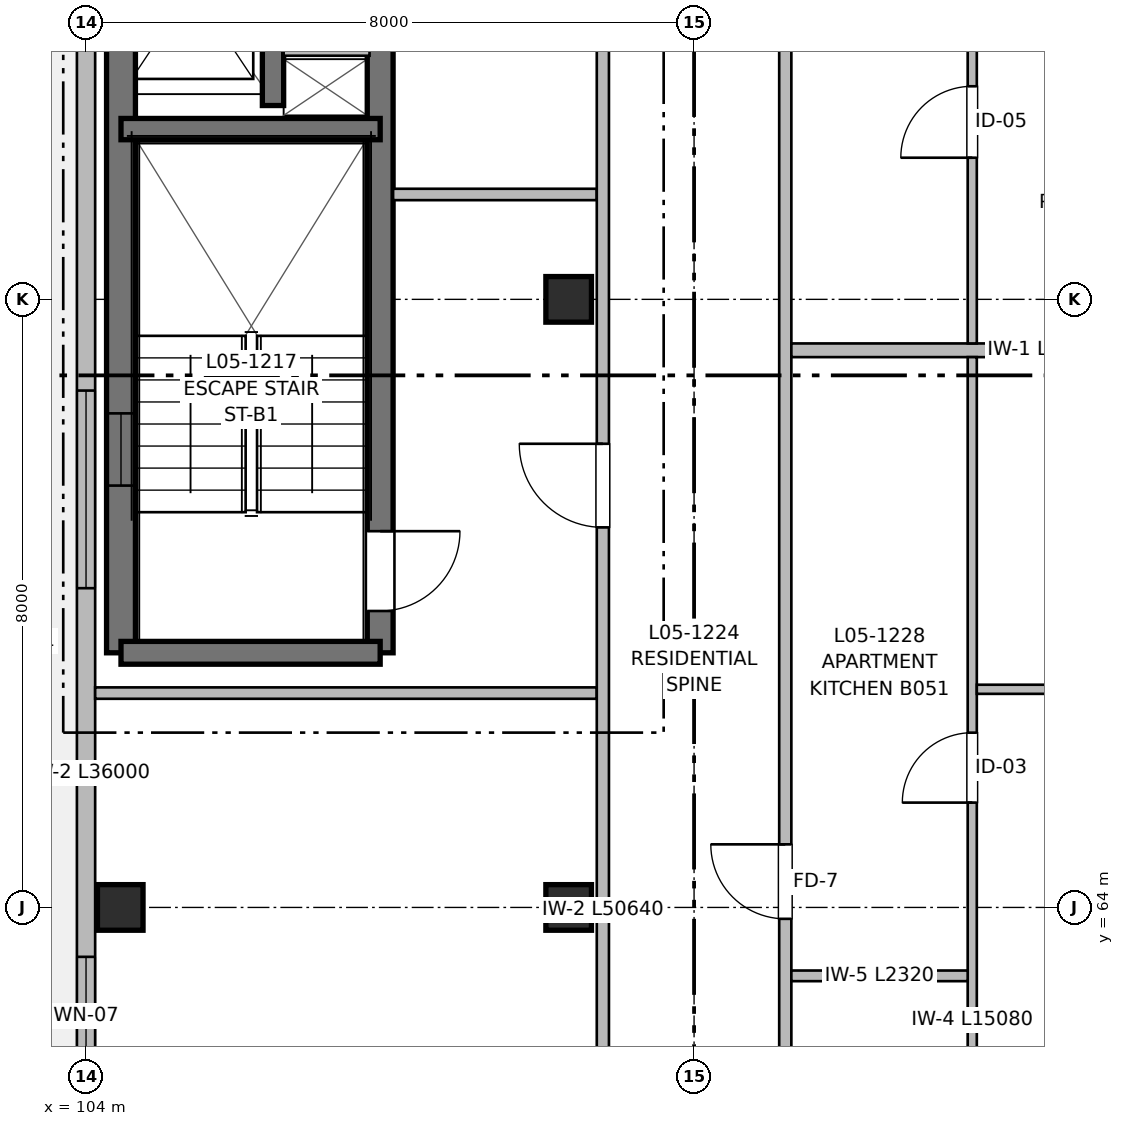
"""IFC4 building model, lengths in metres.
Left out: names, types, materials, properties, quantities, classifications, styles, units other than length and angle.
Written with IfcOpenShell. Run it as: python <this file> out.ifc"""

import sys

from ifc_helpers import new_model, si_unit, direction, frame, frame_2d, origin, origin_2d, place, context, subcontext, project, spatial, rectangle, extrude, element, fill, save


model = new_model("IFC4")
c1 = context("Model", 3, precision=1e-05, world=origin(), true_north=direction((0.0, 1.0)))
c2 = subcontext(c1, "Body", "Model", "MODEL_VIEW")
j1 = project(units=[si_unit("LENGTHUNIT", "METRE"), si_unit("PLANEANGLEUNIT", "RADIAN")], contexts=[c1])
p1 = place(None, origin())
s1 = spatial("IfcSite", under=j1, at=p1, CompositionType="ELEMENT")
p2 = place(p1, origin())
s2 = spatial("IfcBuilding", under=s1, at=p2, CompositionType="ELEMENT")
p3 = place(p2, frame((0.0, 0.0, 16.96)))
s3 = spatial("IfcBuildingStorey", under=s2, at=p3, CompositionType="ELEMENT", Elevation=16.96)
for number, where, z_axis, x_axis in (
    (1, (104.45, 64.0, 0.0), (0.0, 0.0, 1.0), (1.0, 0.0, 0.0)),
    (2, (110.35, 64.0, 0.0), (0.0, 0.0, 1.0), (1.0, 0.0, 0.0)),
    (3, (110.35, 72.0, 0.0), (0.0, 0.0, 1.0), (1.0, 0.0, 0.0)),
):
    element("IfcColumn", number, at=place(p3, frame(where, z_axis=z_axis, x_axis=x_axis)), inside=s3, PredefinedType="COLUMN", context=c2, shape_type="SweptSolid", body=[
        extrude(rectangle(XDim=0.6, YDim=0.6, at=origin_2d()), origin(), (0.0, 0.0, 1.0), 3.2),
    ])
p4 = place(p3, frame((104.46, 67.35, 0.0), z_axis=(0.0, 0.0, 1.0), x_axis=(0.0, 1.0, 0.0)))
e4 = element("IfcWall", 4, at=p4, inside=s3, PredefinedType="SHEAR", context=c2, shape_type="SweptSolid", body=[
    extrude(rectangle(XDim=12.45, YDim=0.38, at=frame_2d((6.225, 0.0))), origin(), (0.0, 0.0, 1.0), 3.2),
])
p5 = place(p4, frame((2.2, 0.0, 0.97)))
e5 = element("IfcOpeningElement", 5, at=p5, cuts=e4, PredefinedType="OPENING", context=c2, shape_type="SweptSolid", body=[
    extrude(rectangle(XDim=0.95, YDim=1.25, at=frame_2d((0.475, 0.625))), frame((0.0, 0.2, 0.0), z_axis=(0.0, -1.0, 0.0), x_axis=(1.0, 0.0, 0.0)), (0.0, 0.0, 1.0), 0.4),
])
p6 = place(p3, frame((107.87, 79.8, 0.0), z_axis=(0.0, 0.0, 1.0), x_axis=(0.0, -1.0, 0.0)))
e6 = element("IfcWall", 6, at=p6, inside=s3, PredefinedType="SHEAR", context=c2, shape_type="SweptSolid", body=[
    extrude(rectangle(XDim=12.45, YDim=0.34, at=frame_2d((6.225, 0.0))), origin(), (0.0, 0.0, 1.0), 3.2),
])
p7 = place(p6, frame((10.85, 0.0, 0.0)))
e7 = element("IfcOpeningElement", 7, at=p7, cuts=e6, PredefinedType="OPENING", context=c2, shape_type="SweptSolid", body=[
    extrude(rectangle(XDim=1.05, YDim=2.15, at=frame_2d((0.525, 1.075))), frame((0.0, 0.18, 0.0), z_axis=(0.0, -1.0, 0.0), x_axis=(1.0, 0.0, 0.0)), (0.0, 0.0, 1.0), 0.36),
])
p8 = place(p3, frame((107.87, 67.35, 0.0), z_axis=(0.0, 0.0, 1.0), x_axis=(-1.0, 0.0, 0.0)))
e8 = element("IfcWall", 8, at=p8, inside=s3, PredefinedType="SHEAR", context=c2, shape_type="SweptSolid", body=[
    extrude(rectangle(XDim=3.41, YDim=0.3, at=frame_2d((1.705, 0.0))), origin(), (0.0, 0.0, 1.0), 3.2),
])
p9 = place(p3, frame((104.46, 74.24, 0.0), z_axis=(0.0, 0.0, 1.0), x_axis=(1.0, 0.0, 0.0)))
e9 = element("IfcWall", 9, at=p9, inside=s3, PredefinedType="SHEAR", context=c2, shape_type="SweptSolid", body=[
    extrude(rectangle(XDim=3.41, YDim=0.28, at=frame_2d((1.705, 0.0))), origin(), (0.0, 0.0, 1.0), 3.2),
])
p10 = place(p3, frame((106.46, 74.55, 0.0), z_axis=(0.0, 0.0, 1.0), x_axis=(0.0, 1.0, 0.0)))
e10 = element("IfcWall", 10, at=p10, inside=s3, PredefinedType="SHEAR", context=c2, shape_type="SweptSolid", body=[
    extrude(rectangle(XDim=5.25, YDim=0.28, at=frame_2d((2.625, 0.0))), origin(), (0.0, 0.0, 1.0), 3.2),
])
p11 = place(p10, frame((1.15, 0.0, 0.0)))
e11 = element("IfcOpeningElement", 11, at=p11, cuts=e10, PredefinedType="OPENING", context=c2, shape_type="SweptSolid", body=[
    extrude(rectangle(XDim=1.0, YDim=2.15, at=frame_2d((0.5, 1.075))), frame((0.0, 0.15, 0.0), z_axis=(0.0, -1.0, 0.0), x_axis=(1.0, 0.0, 0.0)), (0.0, 0.0, 1.0), 0.3),
])
p12 = place(p10, frame((3.85, 0.0, 0.0)))
e12 = element("IfcOpeningElement", 12, at=p12, cuts=e10, PredefinedType="OPENING", context=c2, shape_type="SweptSolid", body=[
    extrude(rectangle(XDim=0.9, YDim=2.15, at=frame_2d((0.45, 1.075))), frame((0.0, 0.15, 0.0), z_axis=(0.0, -1.0, 0.0), x_axis=(1.0, 0.0, 0.0)), (0.0, 0.0, 1.0), 0.3),
])
p13 = place(p3, frame((106.6, 75.28, 0.0), z_axis=(0.0, 0.0, 1.0), x_axis=(1.0, 0.0, 0.0)))
e13 = element("IfcWall", 13, at=p13, inside=s3, PredefinedType="PARTITIONING", context=c2, shape_type="SweptSolid", body=[
    extrude(rectangle(XDim=1.13, YDim=0.15, at=frame_2d((0.565, 0.0))), origin(), (0.0, 0.0, 1.0), 2.95),
])
p14 = place(p3, frame((104.0, 56.0, 0.0), z_axis=(0.0, 0.0, 1.0), x_axis=(0.0, 1.0, 0.0)))
e14 = element("IfcWall", 14, at=p14, inside=s3, PredefinedType="SOLIDWALL", context=c2, shape_type="SweptSolid", body=[
    extrude(rectangle(XDim=36.0, YDim=0.24, at=frame_2d((18.0, 0.0))), origin(), (0.0, 0.0, 1.0), 2.98),
])
p15 = place(p14, frame((3.9, 0.0, 0.0)))
e15 = element("IfcOpeningElement", 15, at=p15, cuts=e14, PredefinedType="OPENING", context=c2, shape_type="SweptSolid", body=[
    extrude(rectangle(XDim=1.2, YDim=2.2, at=frame_2d((0.6, 1.1))), frame((0.0, 0.13, 0.0), z_axis=(0.0, -1.0, 0.0), x_axis=(1.0, 0.0, 0.0)), (0.0, 0.0, 1.0), 0.26),
])
p16 = place(p14, frame((5.8, 0.0, 0.82)))
e16 = element("IfcOpeningElement", 16, at=p16, cuts=e14, PredefinedType="OPENING", context=c2, shape_type="SweptSolid", body=[
    extrude(rectangle(XDim=1.55, YDim=1.4, at=frame_2d((0.775, 0.7))), frame((0.0, 0.13, 0.0), z_axis=(0.0, -1.0, 0.0), x_axis=(1.0, 0.0, 0.0)), (0.0, 0.0, 1.0), 0.26),
])
p17 = place(p14, frame((12.2, 0.0, 0.67)))
e17 = element("IfcOpeningElement", 17, at=p17, cuts=e14, PredefinedType="OPENING", context=c2, shape_type="SweptSolid", body=[
    extrude(rectangle(XDim=2.6, YDim=1.55, at=frame_2d((1.3, 0.775))), frame((0.0, 0.13, 0.0), z_axis=(0.0, -1.0, 0.0), x_axis=(1.0, 0.0, 0.0)), (0.0, 0.0, 1.0), 0.26),
])
p18 = place(p14, frame((19.86, 0.0, 0.72)))
e18 = element("IfcOpeningElement", 18, at=p18, cuts=e14, PredefinedType="OPENING", context=c2, shape_type="SweptSolid", body=[
    extrude(rectangle(XDim=1.68, YDim=1.5, at=frame_2d((0.84, 0.75))), frame((0.0, 0.13, 0.0), z_axis=(0.0, -1.0, 0.0), x_axis=(1.0, 0.0, 0.0)), (0.0, 0.0, 1.0), 0.26),
])
p19 = place(p14, frame((30.6, 0.0, 0.72)))
e19 = element("IfcOpeningElement", 19, at=p19, cuts=e14, PredefinedType="OPENING", context=c2, shape_type="SweptSolid", body=[
    extrude(rectangle(XDim=1.8, YDim=1.5, at=frame_2d((0.9, 0.75))), frame((0.0, 0.13, 0.0), z_axis=(0.0, -1.0, 0.0), x_axis=(1.0, 0.0, 0.0)), (0.0, 0.0, 1.0), 0.26),
])
p20 = place(p3, frame((104.12, 66.82, 0.0), z_axis=(0.0, 0.0, 1.0), x_axis=(1.0, 0.0, 0.0)))
e20 = element("IfcWall", 20, at=p20, inside=s3, PredefinedType="PARTITIONING", context=c2, shape_type="SweptSolid", body=[
    extrude(rectangle(XDim=6.6, YDim=0.15, at=frame_2d((3.3, 0.0))), origin(), (0.0, 0.0, 1.0), 2.935),
])
p21 = place(p3, frame((108.04, 73.38, 0.0), z_axis=(0.0, 0.0, 1.0), x_axis=(1.0, 0.0, 0.0)))
e21 = element("IfcWall", 21, at=p21, inside=s3, PredefinedType="PARTITIONING", context=c2, shape_type="SweptSolid", body=[
    extrude(rectangle(XDim=2.68, YDim=0.15, at=frame_2d((1.34, 0.0))), origin(), (0.0, 0.0, 1.0), 2.935),
])
p22 = place(p3, frame((110.8, 56.16, 0.0), z_axis=(0.0, 0.0, 1.0), x_axis=(0.0, 1.0, 0.0)))
e22 = element("IfcWall", 22, at=p22, inside=s3, PredefinedType="PARTITIONING", context=c2, shape_type="SweptSolid", body=[
    extrude(rectangle(XDim=50.64, YDim=0.16, at=frame_2d((25.32, 0.0))), origin(), (0.0, 0.0, 1.0), 2.935),
])
p23 = place(p22, frame((12.84, 0.0, 0.0)))
e23 = element("IfcOpeningElement", 23, at=p23, cuts=e22, PredefinedType="OPENING", context=c2, shape_type="SweptSolid", body=[
    extrude(rectangle(XDim=1.1, YDim=2.15, at=frame_2d((0.55, 1.075))), frame((0.0, 0.09, 0.0), z_axis=(0.0, -1.0, 0.0), x_axis=(1.0, 0.0, 0.0)), (0.0, 0.0, 1.0), 0.18),
])
p24 = place(p22, frame((19.24, 0.0, 0.0)))
e24 = element("IfcOpeningElement", 24, at=p24, cuts=e22, PredefinedType="OPENING", context=c2, shape_type="SweptSolid", body=[
    extrude(rectangle(XDim=1.6, YDim=2.15, at=frame_2d((0.8, 1.075))), frame((0.0, 0.09, 0.0), z_axis=(0.0, -1.0, 0.0), x_axis=(1.0, 0.0, 0.0)), (0.0, 0.0, 1.0), 0.18),
])
p25 = place(p22, frame((1.8, 0.0, 0.0)))
e25 = element("IfcOpeningElement", 25, at=p25, cuts=e22, PredefinedType="OPENING", context=c2, shape_type="SweptSolid", body=[
    extrude(rectangle(XDim=0.96, YDim=2.15, at=frame_2d((0.48, 1.075))), frame((0.0, 0.09, 0.0), z_axis=(0.0, -1.0, 0.0), x_axis=(1.0, 0.0, 0.0)), (0.0, 0.0, 1.0), 0.18),
])
p26 = place(p22, frame((32.645, 0.0, 0.0)))
e26 = element("IfcOpeningElement", 26, at=p26, cuts=e22, PredefinedType="OPENING", context=c2, shape_type="SweptSolid", body=[
    extrude(rectangle(XDim=0.98, YDim=2.15, at=frame_2d((0.49, 1.075))), frame((0.0, 0.09, 0.0), z_axis=(0.0, -1.0, 0.0), x_axis=(1.0, 0.0, 0.0)), (0.0, 0.0, 1.0), 0.18),
])
p27 = place(p22, frame((41.255, 0.0, 0.0)))
e27 = element("IfcOpeningElement", 27, at=p27, cuts=e22, PredefinedType="OPENING", context=c2, shape_type="SweptSolid", body=[
    extrude(rectangle(XDim=0.98, YDim=2.15, at=frame_2d((0.49, 1.075))), frame((0.0, 0.09, 0.0), z_axis=(0.0, -1.0, 0.0), x_axis=(1.0, 0.0, 0.0)), (0.0, 0.0, 1.0), 0.18),
])
p28 = place(p3, frame((113.2, 56.16, 0.0), z_axis=(0.0, 0.0, 1.0), x_axis=(0.0, 1.0, 0.0)))
e28 = element("IfcWall", 28, at=p28, inside=s3, PredefinedType="PARTITIONING", context=c2, shape_type="SweptSolid", body=[
    extrude(rectangle(XDim=50.64, YDim=0.16, at=frame_2d((25.32, 0.0))), origin(), (0.0, 0.0, 1.0), 2.935),
])
p29 = place(p28, frame((7.69, 0.0, 0.0)))
e29 = element("IfcOpeningElement", 29, at=p29, cuts=e28, PredefinedType="OPENING", context=c2, shape_type="SweptSolid", body=[
    extrude(rectangle(XDim=0.98, YDim=2.15, at=frame_2d((0.49, 1.075))), frame((0.0, 0.09, 0.0), z_axis=(0.0, -1.0, 0.0), x_axis=(1.0, 0.0, 0.0)), (0.0, 0.0, 1.0), 0.18),
])
p30 = place(p28, frame((22.44, 0.0, 0.0)))
e30 = element("IfcOpeningElement", 30, at=p30, cuts=e28, PredefinedType="OPENING", context=c2, shape_type="SweptSolid", body=[
    extrude(rectangle(XDim=1.02, YDim=2.15, at=frame_2d((0.51, 1.075))), frame((0.0, 0.09, 0.0), z_axis=(0.0, -1.0, 0.0), x_axis=(1.0, 0.0, 0.0)), (0.0, 0.0, 1.0), 0.18),
])
p31 = place(p28, frame((35.66, 0.0, 0.0)))
e31 = element("IfcOpeningElement", 31, at=p31, cuts=e28, PredefinedType="OPENING", context=c2, shape_type="SweptSolid", body=[
    extrude(rectangle(XDim=0.98, YDim=2.15, at=frame_2d((0.49, 1.075))), frame((0.0, 0.09, 0.0), z_axis=(0.0, -1.0, 0.0), x_axis=(1.0, 0.0, 0.0)), (0.0, 0.0, 1.0), 0.18),
])
p32 = place(p28, frame((46.44, 0.0, 0.0)))
e32 = element("IfcOpeningElement", 32, at=p32, cuts=e28, PredefinedType="OPENING", context=c2, shape_type="SweptSolid", body=[
    extrude(rectangle(XDim=0.98, YDim=2.15, at=frame_2d((0.49, 1.075))), frame((0.0, 0.09, 0.0), z_axis=(0.0, -1.0, 0.0), x_axis=(1.0, 0.0, 0.0)), (0.0, 0.0, 1.0), 0.18),
])
p33 = place(p3, frame((113.28, 71.33, 0.0), z_axis=(0.0, 0.0, 1.0), x_axis=(1.0, 0.0, 0.0)))
e33 = element("IfcWall", 33, at=p33, inside=s3, PredefinedType="PARTITIONING", context=c2, shape_type="SweptSolid", body=[
    extrude(rectangle(XDim=6.6, YDim=0.18, at=frame_2d((3.3, 0.0))), origin(), (0.0, 0.0, 1.0), 2.935),
])
p34 = place(p3, frame((115.66, 56.16, 0.0), z_axis=(0.0, 0.0, 1.0), x_axis=(0.0, 1.0, 0.0)))
e34 = element("IfcWall", 34, at=p34, inside=s3, PredefinedType="PARTITIONING", context=c2, shape_type="SweptSolid", body=[
    extrude(rectangle(XDim=15.08, YDim=0.12, at=frame_2d((7.54, 0.0))), origin(), (0.0, 0.0, 1.0), 2.935),
])
p35 = place(p34, frame((2.637, 0.0, 0.0)))
e35 = element("IfcOpeningElement", 35, at=p35, cuts=e34, PredefinedType="OPENING", context=c2, shape_type="SweptSolid", body=[
    extrude(rectangle(XDim=0.86, YDim=2.1, at=frame_2d((0.43, 1.05))), frame((0.0, 0.07, 0.0), z_axis=(0.0, -1.0, 0.0), x_axis=(1.0, 0.0, 0.0)), (0.0, 0.0, 1.0), 0.14),
])
p36 = place(p34, frame((9.219, 0.0, 0.0)))
e36 = element("IfcOpeningElement", 36, at=p36, cuts=e34, PredefinedType="OPENING", context=c2, shape_type="SweptSolid", body=[
    extrude(rectangle(XDim=0.92, YDim=2.1, at=frame_2d((0.46, 1.05))), frame((0.0, 0.07, 0.0), z_axis=(0.0, -1.0, 0.0), x_axis=(1.0, 0.0, 0.0)), (0.0, 0.0, 1.0), 0.14),
])
p37 = place(p3, frame((113.28, 63.1, 0.0), z_axis=(0.0, 0.0, 1.0), x_axis=(1.0, 0.0, 0.0)))
e37 = element("IfcWall", 37, at=p37, inside=s3, PredefinedType="PARTITIONING", context=c2, shape_type="SweptSolid", body=[
    extrude(rectangle(XDim=2.32, YDim=0.14, at=frame_2d((1.16, 0.0))), origin(), (0.0, 0.0, 1.0), 2.935),
])
p38 = place(p3, frame((115.72, 66.87, 0.0), z_axis=(0.0, 0.0, 1.0), x_axis=(1.0, 0.0, 0.0)))
e38 = element("IfcWall", 38, at=p38, inside=s3, PredefinedType="PARTITIONING", context=c2, shape_type="SweptSolid", body=[
    extrude(rectangle(XDim=4.16, YDim=0.12, at=frame_2d((2.08, 0.0))), origin(), (0.0, 0.0, 1.0), 2.935),
])
p39 = place(p38, frame((1.64, 0.0, 0.0)))
e39 = element("IfcOpeningElement", 39, at=p39, cuts=e38, PredefinedType="OPENING", context=c2, shape_type="SweptSolid", body=[
    extrude(rectangle(XDim=0.88, YDim=2.1, at=frame_2d((0.44, 1.05))), frame((0.0, 0.07, 0.0), z_axis=(0.0, -1.0, 0.0), x_axis=(1.0, 0.0, 0.0)), (0.0, 0.0, 1.0), 0.14),
])
p40 = place(p3, frame((115.66, 71.42, 0.0), z_axis=(0.0, 0.0, 1.0), x_axis=(0.0, 1.0, 0.0)))
e40 = element("IfcWall", 40, at=p40, inside=s3, PredefinedType="PARTITIONING", context=c2, shape_type="SweptSolid", body=[
    extrude(rectangle(XDim=13.97, YDim=0.12, at=frame_2d((6.985, 0.0))), origin(), (0.0, 0.0, 1.0), 2.935),
])
p41 = place(p40, frame((2.443, 0.0, 0.0)))
e41 = element("IfcOpeningElement", 41, at=p41, cuts=e40, PredefinedType="OPENING", context=c2, shape_type="SweptSolid", body=[
    extrude(rectangle(XDim=0.94, YDim=2.1, at=frame_2d((0.47, 1.05))), frame((0.0, 0.07, 0.0), z_axis=(0.0, -1.0, 0.0), x_axis=(1.0, 0.0, 0.0)), (0.0, 0.0, 1.0), 0.14),
])
p42 = place(p40, frame((8.541, 0.0, 0.0)))
e42 = element("IfcOpeningElement", 42, at=p42, cuts=e40, PredefinedType="OPENING", context=c2, shape_type="SweptSolid", body=[
    extrude(rectangle(XDim=0.92, YDim=2.1, at=frame_2d((0.46, 1.05))), frame((0.0, 0.07, 0.0), z_axis=(0.0, -1.0, 0.0), x_axis=(1.0, 0.0, 0.0)), (0.0, 0.0, 1.0), 0.14),
])
p43 = place(p7, origin())
e43 = element("IfcDoor", 43, at=p43, inside=s3, OperationType="SINGLE_SWING_LEFT", PredefinedType="DOOR", context=c2, shape_type="SweptSolid", body=[
    extrude(rectangle(XDim=1.05, YDim=2.15, at=frame_2d((0.525, 1.075))), frame((0.0, 0.025, 0.0), z_axis=(0.0, -1.0, 0.0), x_axis=(1.0, 0.0, 0.0)), (0.0, 0.0, 1.0), 0.05),
])
fill(e7, e43)
p44 = place(p5, origin())
e44 = element("IfcWindow", 44, at=p44, inside=s3, PartitioningType="SINGLE_PANEL", PredefinedType="WINDOW", context=c2, shape_type="SweptSolid", body=[
    extrude(rectangle(XDim=0.95, YDim=1.25, at=frame_2d((0.475, 0.625))), frame((0.0, 0.03, 0.0), z_axis=(0.0, -1.0, 0.0), x_axis=(1.0, 0.0, 0.0)), (0.0, 0.0, 1.0), 0.06),
])
fill(e5, e44)
p45 = place(p16, origin())
e45 = element("IfcWindow", 45, at=p45, inside=s3, PartitioningType="SINGLE_PANEL", PredefinedType="WINDOW", context=c2, shape_type="SweptSolid", body=[
    extrude(rectangle(XDim=1.55, YDim=1.4, at=frame_2d((0.775, 0.7))), frame((0.0, 0.03, 0.0), z_axis=(0.0, -1.0, 0.0), x_axis=(1.0, 0.0, 0.0)), (0.0, 0.0, 1.0), 0.06),
])
fill(e16, e45)
p46 = place(p17, origin())
e46 = element("IfcWindow", 46, at=p46, inside=s3, PartitioningType="SINGLE_PANEL", PredefinedType="WINDOW", context=c2, shape_type="SweptSolid", body=[
    extrude(rectangle(XDim=2.6, YDim=1.55, at=frame_2d((1.3, 0.775))), frame((0.0, 0.03, 0.0), z_axis=(0.0, -1.0, 0.0), x_axis=(1.0, 0.0, 0.0)), (0.0, 0.0, 1.0), 0.06),
])
fill(e17, e46)
p47 = place(p23, origin())
e47 = element("IfcDoor", 47, at=p47, inside=s3, OperationType="SINGLE_SWING_RIGHT", PredefinedType="DOOR", context=c2, shape_type="SweptSolid", body=[
    extrude(rectangle(XDim=1.1, YDim=2.15, at=frame_2d((0.55, 1.075))), frame((0.0, 0.025, 0.0), z_axis=(0.0, -1.0, 0.0), x_axis=(1.0, 0.0, 0.0)), (0.0, 0.0, 1.0), 0.05),
])
fill(e23, e47)
p48 = place(p36, origin())
e48 = element("IfcDoor", 48, at=p48, inside=s3, OperationType="SINGLE_SWING_LEFT", PredefinedType="DOOR", context=c2, shape_type="SweptSolid", body=[
    extrude(rectangle(XDim=0.92, YDim=2.1, at=frame_2d((0.46, 1.05))), frame((0.0, 0.025, 0.0), z_axis=(0.0, -1.0, 0.0), x_axis=(1.0, 0.0, 0.0)), (0.0, 0.0, 1.0), 0.05),
])
fill(e36, e48)
p49 = place(p29, origin())
e49 = element("IfcDoor", 49, at=p49, inside=s3, OperationType="SINGLE_SWING_RIGHT", PredefinedType="DOOR", context=c2, shape_type="SweptSolid", body=[
    extrude(rectangle(XDim=0.98, YDim=2.15, at=frame_2d((0.49, 1.075))), frame((0.0, 0.025, 0.0), z_axis=(0.0, -1.0, 0.0), x_axis=(1.0, 0.0, 0.0)), (0.0, 0.0, 1.0), 0.05),
])
fill(e29, e49)
p50 = place(p41, origin())
e50 = element("IfcDoor", 50, at=p50, inside=s3, OperationType="SINGLE_SWING_LEFT", PredefinedType="DOOR", context=c2, shape_type="SweptSolid", body=[
    extrude(rectangle(XDim=0.94, YDim=2.1, at=frame_2d((0.47, 1.05))), frame((0.0, 0.025, 0.0), z_axis=(0.0, -1.0, 0.0), x_axis=(1.0, 0.0, 0.0)), (0.0, 0.0, 1.0), 0.05),
])
fill(e41, e50)
save(model, sys.argv[1])
